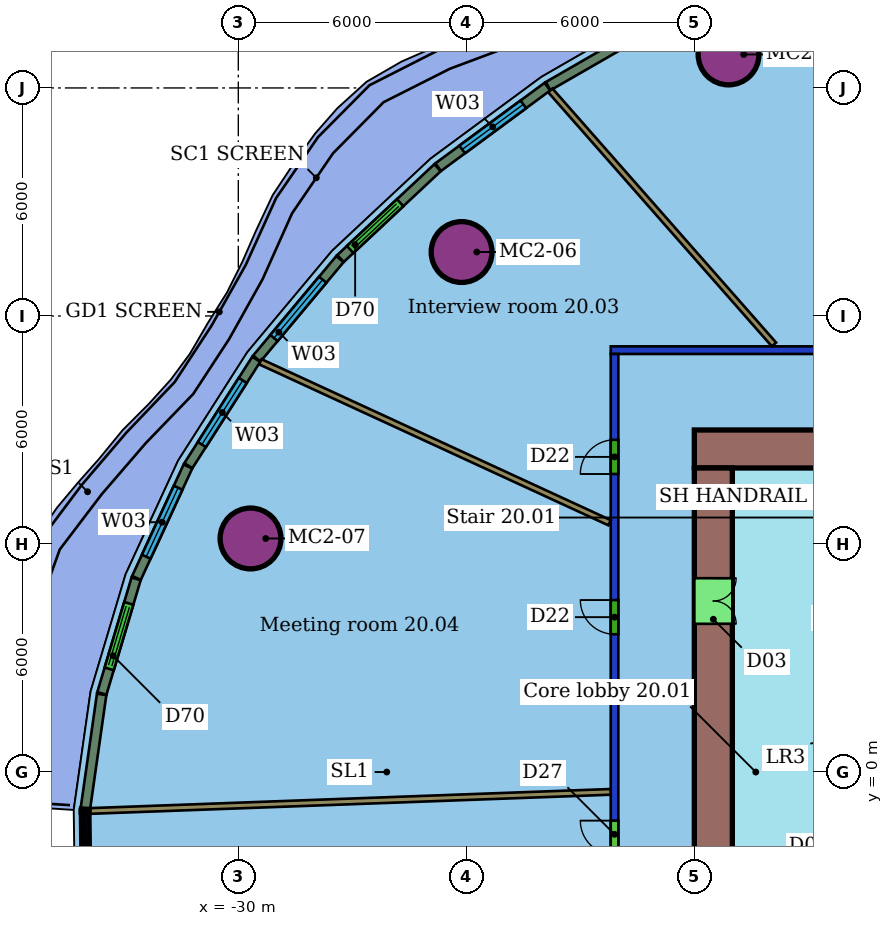
"""IFC4 building model, lengths in metres.
Left out: names, types, materials, properties, quantities, classifications, styles, units other than length and angle.
Written with IfcOpenShell. Run it as: python <this file> out.ifc"""

import sys

from ifc_helpers import new_model, si_unit, direction, frame, frame_2d, origin, origin_2d, place, context, subcontext, project, spatial, rectangle, hollow_circle, extrude, element, fill, save


model = new_model("IFC4")
c1 = context("Model", 3, precision=1e-05, world=origin(), true_north=direction((0.0, 1.0)))
c2 = subcontext(c1, "Body", "Model", "MODEL_VIEW")
j1 = project(units=[si_unit("LENGTHUNIT", "METRE"), si_unit("PLANEANGLEUNIT", "RADIAN")], contexts=[c1])
p1 = place(None, origin())
s1 = spatial("IfcSite", under=j1, at=p1, CompositionType="ELEMENT")
p2 = place(p1, origin())
s2 = spatial("IfcBuilding", under=s1, at=p2, CompositionType="ELEMENT")
p3 = place(p2, frame((0.0, 0.0, 92.2)))
s3 = spatial("IfcBuildingStorey", under=s2, at=p3, CompositionType="ELEMENT", Elevation=92.2)
for number, where, z_axis, x_axis in (
    (1, (-17.1, 18.881, 0.0), (0.0, 0.0, 1.0), (1.0, 0.0, 0.0)),
    (2, (-24.125, 13.683, 0.0), (0.0, 0.0, 1.0), (1.0, 0.0, 0.0)),
    (3, (-29.679, 6.146, 0.0), (0.0, 0.0, 1.0), (1.0, 0.0, 0.0)),
):
    element("IfcColumn", number, at=place(p3, frame(where, z_axis=z_axis, x_axis=x_axis)), inside=s3, PredefinedType="COLUMN", context=c2, shape_type="SweptSolid", body=[
        extrude(hollow_circle(Radius=0.8, WallThickness=0.055, at=origin_2d()), origin(), (0.0, 0.0, 1.0), 3.45),
    ])
p4 = place(p3, frame((-20.1, -11.0, 0.0), z_axis=(0.0, 0.0, 1.0), x_axis=(0.0, 1.0, 0.0)))
e4 = element("IfcWall", 4, at=p4, inside=s3, PredefinedType="PARTITIONING", context=c2, shape_type="SweptSolid", body=[
    extrude(rectangle(XDim=22.0, YDim=0.2, at=frame_2d((11.0, 0.0))), origin(), (0.0, 0.0, 1.0), 3.0),
])
p5 = place(p4, frame((18.842, 0.0, 0.0)))
e5 = element("IfcOpeningElement", 5, at=p5, cuts=e4, PredefinedType="OPENING", context=c2, shape_type="SweptSolid", body=[
    extrude(rectangle(XDim=0.9, YDim=2.1, at=frame_2d((0.45, 1.05))), frame((0.0, 0.11, 0.0), z_axis=(0.0, -1.0, 0.0), x_axis=(1.0, 0.0, 0.0)), (0.0, 0.0, 1.0), 0.22),
])
p6 = place(p4, frame((14.625, 0.0, 0.0)))
e6 = element("IfcOpeningElement", 6, at=p6, cuts=e4, PredefinedType="OPENING", context=c2, shape_type="SweptSolid", body=[
    extrude(rectangle(XDim=0.9, YDim=2.1, at=frame_2d((0.45, 1.05))), frame((0.0, 0.11, 0.0), z_axis=(0.0, -1.0, 0.0), x_axis=(1.0, 0.0, 0.0)), (0.0, 0.0, 1.0), 0.22),
])
p7 = place(p4, frame((7.921, 0.0, 0.0)))
e7 = element("IfcOpeningElement", 7, at=p7, cuts=e4, PredefinedType="OPENING", context=c2, shape_type="SweptSolid", body=[
    extrude(rectangle(XDim=1.8, YDim=2.4, at=frame_2d((0.9, 1.2))), frame((0.0, 0.11, 0.0), z_axis=(0.0, -1.0, 0.0), x_axis=(1.0, 0.0, 0.0)), (0.0, 0.0, 1.0), 0.22),
])
p8 = place(p3, frame((-20.2, 11.1, 0.0), z_axis=(0.0, 0.0, 1.0), x_axis=(1.0, 0.0, 0.0)))
e8 = element("IfcWall", 8, at=p8, inside=s3, PredefinedType="PARTITIONING", context=c2, shape_type="SweptSolid", body=[
    extrude(rectangle(XDim=28.4, YDim=0.2, at=frame_2d((14.2, 0.0))), origin(), (0.0, 0.0, 1.0), 3.0),
])
p9 = place(p8, frame((21.08, 0.0, 0.0)))
e9 = element("IfcOpeningElement", 9, at=p9, cuts=e8, PredefinedType="OPENING", context=c2, shape_type="SweptSolid", body=[
    extrude(rectangle(XDim=1.8, YDim=2.1, at=frame_2d((0.9, 1.05))), frame((0.0, 0.11, 0.0), z_axis=(0.0, -1.0, 0.0), x_axis=(1.0, 0.0, 0.0)), (0.0, 0.0, 1.0), 0.22),
])
p10 = place(p8, frame((12.812, 0.0, 0.0)))
e10 = element("IfcOpeningElement", 10, at=p10, cuts=e8, PredefinedType="OPENING", context=c2, shape_type="SweptSolid", body=[
    extrude(rectangle(XDim=1.8, YDim=2.1, at=frame_2d((0.9, 1.05))), frame((0.0, 0.11, 0.0), z_axis=(0.0, -1.0, 0.0), x_axis=(1.0, 0.0, 0.0)), (0.0, 0.0, 1.0), 0.22),
])
p11 = place(p3, frame((-21.79, 17.936, 0.0), z_axis=(0.0, 0.0, 1.0), x_axis=(0.660761943982, -0.750595532484, 0.0)))
e11 = element("IfcWall", 11, at=p11, inside=s3, PredefinedType="PARTITIONING", context=c2, shape_type="SweptSolid", body=[
    extrude(rectangle(XDim=8.909, YDim=0.15, at=frame_2d((4.454, 0.0))), origin(), (0.0, 0.0, 1.0), 3.45),
])
p12 = place(p3, frame((-29.421, 10.796, 0.0), z_axis=(0.0, 0.0, 1.0), x_axis=(0.908154893972, -0.418634313637, 0.0)))
e12 = element("IfcWall", 12, at=p12, inside=s3, PredefinedType="PARTITIONING", context=c2, shape_type="SweptSolid", body=[
    extrude(rectangle(XDim=10.119, YDim=0.15, at=frame_2d((5.06, 0.0))), origin(), (0.0, 0.0, 1.0), 3.45),
])
p13 = place(p3, frame((-33.907, -1.025, 0.0), z_axis=(0.0, 0.0, 1.0), x_axis=(0.999325981894, 0.036709425377, 0.0)))
e13 = element("IfcWall", 13, at=p13, inside=s3, PredefinedType="PARTITIONING", context=c2, shape_type="SweptSolid", body=[
    extrude(rectangle(XDim=13.714, YDim=0.15, at=frame_2d((6.857, 0.0))), origin(), (0.0, 0.0, 1.0), 3.45),
])
p14 = place(p3, frame((-18.741, 19.836, 0.0), z_axis=(0.0, 0.0, 1.0), x_axis=(-0.866511818646, -0.49915655675, 0.0)))
e14 = element("IfcWall", 14, at=p14, inside=s3, PredefinedType="SOLIDWALL", context=c2, shape_type="SweptSolid", body=[
    extrude(rectangle(XDim=3.586, YDim=0.25, at=frame_2d((1.793, 0.0))), origin(), (0.0, 0.0, 1.0), 3.05),
])
p15 = place(p3, frame((-21.867, 18.034, 0.0), z_axis=(0.0, 0.0, 1.0), x_axis=(-0.804847820355, -0.593481243234, 0.0)))
e15 = element("IfcWall", 15, at=p15, inside=s3, PredefinedType="SOLIDWALL", context=c2, shape_type="SweptSolid", body=[
    extrude(rectangle(XDim=3.57, YDim=0.25, at=frame_2d((1.785, 0.0))), origin(), (0.0, 0.0, 1.0), 3.05),
])
p16 = place(p15, frame((0.785, 0.0, 0.9)))
e16 = element("IfcOpeningElement", 16, at=p16, cuts=e15, PredefinedType="OPENING", context=c2, shape_type="SweptSolid", body=[
    extrude(rectangle(XDim=2.0, YDim=2.1, at=frame_2d((1.0, 1.05))), frame((0.0, 0.135, 0.0), z_axis=(0.0, -1.0, 0.0), x_axis=(1.0, 0.0, 0.0)), (0.0, 0.0, 1.0), 0.27),
])
p17 = place(p3, frame((-24.758, 15.901, 0.0), z_axis=(0.0, 0.0, 1.0), x_axis=(-0.730116287539, -0.68332291537, 0.0)))
e17 = element("IfcWall", 17, at=p17, inside=s3, PredefinedType="SOLIDWALL", context=c2, shape_type="SweptSolid", body=[
    extrude(rectangle(XDim=3.496, YDim=0.25, at=frame_2d((1.748, 0.0))), origin(), (0.0, 0.0, 1.0), 3.05),
])
p18 = place(p17, frame((1.348, 0.0, 0.0)))
e18 = element("IfcOpeningElement", 18, at=p18, cuts=e17, PredefinedType="OPENING", context=c2, shape_type="SweptSolid", body=[
    extrude(rectangle(XDim=1.8, YDim=2.4, at=frame_2d((0.9, 1.2))), frame((0.0, 0.135, 0.0), z_axis=(0.0, -1.0, 0.0), x_axis=(1.0, 0.0, 0.0)), (0.0, 0.0, 1.0), 0.27),
])
p19 = place(p3, frame((-27.326, 13.495, 0.0), z_axis=(0.0, 0.0, 1.0), x_axis=(-0.641415804232, -0.767193434593, 0.0)))
e19 = element("IfcWall", 19, at=p19, inside=s3, PredefinedType="SOLIDWALL", context=c2, shape_type="SweptSolid", body=[
    extrude(rectangle(XDim=3.41, YDim=0.25, at=frame_2d((1.705, 0.0))), origin(), (0.0, 0.0, 1.0), 3.05),
])
p20 = place(p19, frame((0.705, 0.0, 0.9)))
e20 = element("IfcOpeningElement", 20, at=p20, cuts=e19, PredefinedType="OPENING", context=c2, shape_type="SweptSolid", body=[
    extrude(rectangle(XDim=2.0, YDim=2.1, at=frame_2d((1.0, 1.05))), frame((0.0, 0.135, 0.0), z_axis=(0.0, -1.0, 0.0), x_axis=(1.0, 0.0, 0.0)), (0.0, 0.0, 1.0), 0.27),
])
p21 = place(p3, frame((-29.528, 10.86, 0.0), z_axis=(0.0, 0.0, 1.0), x_axis=(-0.537922040575, -0.8429945897, 0.0)))
e21 = element("IfcWall", 21, at=p21, inside=s3, PredefinedType="SOLIDWALL", context=c2, shape_type="SweptSolid", body=[
    extrude(rectangle(XDim=3.32, YDim=0.25, at=frame_2d((1.66, 0.0))), origin(), (0.0, 0.0, 1.0), 3.05),
])
p22 = place(p21, frame((0.66, 0.0, 0.9)))
e22 = element("IfcOpeningElement", 22, at=p22, cuts=e21, PredefinedType="OPENING", context=c2, shape_type="SweptSolid", body=[
    extrude(rectangle(XDim=2.0, YDim=2.1, at=frame_2d((1.0, 1.05))), frame((0.0, 0.135, 0.0), z_axis=(0.0, -1.0, 0.0), x_axis=(1.0, 0.0, 0.0)), (0.0, 0.0, 1.0), 0.27),
])
p23 = place(p3, frame((-31.326, 8.039, 0.0), z_axis=(0.0, 0.0, 1.0), x_axis=(-0.41936019053, -0.907819932916, 0.0)))
e23 = element("IfcWall", 23, at=p23, inside=s3, PredefinedType="SOLIDWALL", context=c2, shape_type="SweptSolid", body=[
    extrude(rectangle(XDim=3.229, YDim=0.25, at=frame_2d((1.615, 0.0))), origin(), (0.0, 0.0, 1.0), 3.05),
])
p24 = place(p23, frame((0.615, 0.0, 0.9)))
e24 = element("IfcOpeningElement", 24, at=p24, cuts=e23, PredefinedType="OPENING", context=c2, shape_type="SweptSolid", body=[
    extrude(rectangle(XDim=2.0, YDim=2.1, at=frame_2d((1.0, 1.05))), frame((0.0, 0.135, 0.0), z_axis=(0.0, -1.0, 0.0), x_axis=(1.0, 0.0, 0.0)), (0.0, 0.0, 1.0), 0.27),
])
p25 = place(p3, frame((-32.689, 5.083, 0.0), z_axis=(0.0, 0.0, 1.0), x_axis=(-0.286322623224, -0.958133266008, 0.0)))
e25 = element("IfcWall", 25, at=p25, inside=s3, PredefinedType="SOLIDWALL", context=c2, shape_type="SweptSolid", body=[
    extrude(rectangle(XDim=3.146, YDim=0.25, at=frame_2d((1.573, 0.0))), origin(), (0.0, 0.0, 1.0), 3.05),
])
p26 = place(p25, frame((0.673, 0.0, 0.0)))
e26 = element("IfcOpeningElement", 26, at=p26, cuts=e25, PredefinedType="OPENING", context=c2, shape_type="SweptSolid", body=[
    extrude(rectangle(XDim=1.8, YDim=2.4, at=frame_2d((0.9, 1.2))), frame((0.0, 0.135, 0.0), z_axis=(0.0, -1.0, 0.0), x_axis=(1.0, 0.0, 0.0)), (0.0, 0.0, 1.0), 0.27),
])
p27 = place(p3, frame((-33.596, 2.043, 0.0), z_axis=(0.0, 0.0, 1.0), x_axis=(-0.140993456439, -0.990010527844, 0.0)))
e27 = element("IfcWall", 27, at=p27, inside=s3, PredefinedType="SOLIDWALL", context=c2, shape_type="SweptSolid", body=[
    extrude(rectangle(XDim=3.035, YDim=0.25, at=frame_2d((1.518, 0.0))), origin(), (0.0, 0.0, 1.0), 3.05),
])
p28 = place(p3, frame((-6.0, 8.5, 0.0), z_axis=(0.0, 0.0, 1.0), x_axis=(-1.0, 0.0, 0.0)))
e28 = element("IfcWall", 28, at=p28, inside=s3, PredefinedType="SHEAR", context=c2, shape_type="SweptSolid", body=[
    extrude(rectangle(XDim=12.0, YDim=1.0, at=frame_2d((6.0, 0.0))), origin(), (0.0, 0.0, 1.0), 3.3),
])
p29 = place(p28, frame((5.2, 0.0, 0.0)))
e29 = element("IfcOpeningElement", 29, at=p29, cuts=e28, PredefinedType="OPENING", context=c2, shape_type="SweptSolid", body=[
    extrude(rectangle(XDim=1.2, YDim=2.1, at=frame_2d((0.6, 1.05))), frame((0.0, 0.51, 0.0), z_axis=(0.0, -1.0, 0.0), x_axis=(1.0, 0.0, 0.0)), (0.0, 0.0, 1.0), 1.02),
])
p30 = place(p3, frame((-17.5, 8.0, 0.0), z_axis=(0.0, 0.0, 1.0), x_axis=(0.0, -1.0, 0.0)))
e30 = element("IfcWall", 30, at=p30, inside=s3, PredefinedType="SHEAR", context=c2, shape_type="SweptSolid", body=[
    extrude(rectangle(XDim=16.0, YDim=1.0, at=frame_2d((8.0, 0.0))), origin(), (0.0, 0.0, 1.0), 3.3),
])
p31 = place(p30, frame((11.9, 0.0, 0.0)))
e31 = element("IfcOpeningElement", 31, at=p31, cuts=e30, PredefinedType="OPENING", context=c2, shape_type="SweptSolid", body=[
    extrude(rectangle(XDim=1.2, YDim=2.1, at=frame_2d((0.6, 1.05))), frame((0.0, 0.51, 0.0), z_axis=(0.0, -1.0, 0.0), x_axis=(1.0, 0.0, 0.0)), (0.0, 0.0, 1.0), 1.02),
])
p32 = place(p30, frame((2.9, 0.0, 0.0)))
e32 = element("IfcOpeningElement", 32, at=p32, cuts=e30, PredefinedType="OPENING", context=c2, shape_type="SweptSolid", body=[
    extrude(rectangle(XDim=1.2, YDim=2.1, at=frame_2d((0.6, 1.05))), frame((0.0, 0.51, 0.0), z_axis=(0.0, -1.0, 0.0), x_axis=(1.0, 0.0, 0.0)), (0.0, 0.0, 1.0), 1.02),
])
p33 = place(p5, origin())
e33 = element("IfcDoor", 33, at=p33, inside=s3, OperationType="SINGLE_SWING_LEFT", PredefinedType="DOOR", context=c2, shape_type="SweptSolid", body=[
    extrude(rectangle(XDim=0.9, YDim=2.1, at=frame_2d((0.45, 1.05))), frame((0.0, 0.025, 0.0), z_axis=(0.0, -1.0, 0.0), x_axis=(1.0, 0.0, 0.0)), (0.0, 0.0, 1.0), 0.05),
])
fill(e5, e33)
p34 = place(p6, origin())
e34 = element("IfcDoor", 34, at=p34, inside=s3, OperationType="SINGLE_SWING_RIGHT", PredefinedType="DOOR", context=c2, shape_type="SweptSolid", body=[
    extrude(rectangle(XDim=0.9, YDim=2.1, at=frame_2d((0.45, 1.05))), frame((0.0, 0.025, 0.0), z_axis=(0.0, -1.0, 0.0), x_axis=(1.0, 0.0, 0.0)), (0.0, 0.0, 1.0), 0.05),
])
fill(e6, e34)
p35 = place(p7, origin())
e35 = element("IfcDoor", 35, at=p35, inside=s3, OperationType="DOUBLE_DOOR_SINGLE_SWING", PredefinedType="DOOR", context=c2, shape_type="SweptSolid", body=[
    extrude(rectangle(XDim=1.8, YDim=2.4, at=frame_2d((0.9, 1.2))), frame((0.0, 0.025, 0.0), z_axis=(0.0, -1.0, 0.0), x_axis=(1.0, 0.0, 0.0)), (0.0, 0.0, 1.0), 0.05),
])
fill(e7, e35)
p36 = place(p16, origin())
e36 = element("IfcWindow", 36, at=p36, inside=s3, PartitioningType="SINGLE_PANEL", PredefinedType="WINDOW", context=c2, shape_type="SweptSolid", body=[
    extrude(rectangle(XDim=2.0, YDim=2.1, at=frame_2d((1.0, 1.05))), frame((0.0, 0.03, 0.0), z_axis=(0.0, -1.0, 0.0), x_axis=(1.0, 0.0, 0.0)), (0.0, 0.0, 1.0), 0.06),
])
fill(e16, e36)
p37 = place(p18, origin())
e37 = element("IfcDoor", 37, at=p37, inside=s3, OperationType="DOUBLE_DOOR_SLIDING", PredefinedType="DOOR", context=c2, shape_type="SweptSolid", body=[
    extrude(rectangle(XDim=1.8, YDim=2.4, at=frame_2d((0.9, 1.2))), frame((0.0, 0.025, 0.0), z_axis=(0.0, -1.0, 0.0), x_axis=(1.0, 0.0, 0.0)), (0.0, 0.0, 1.0), 0.05),
])
fill(e18, e37)
p38 = place(p20, origin())
e38 = element("IfcWindow", 38, at=p38, inside=s3, PartitioningType="SINGLE_PANEL", PredefinedType="WINDOW", context=c2, shape_type="SweptSolid", body=[
    extrude(rectangle(XDim=2.0, YDim=2.1, at=frame_2d((1.0, 1.05))), frame((0.0, 0.03, 0.0), z_axis=(0.0, -1.0, 0.0), x_axis=(1.0, 0.0, 0.0)), (0.0, 0.0, 1.0), 0.06),
])
fill(e20, e38)
p39 = place(p22, origin())
e39 = element("IfcWindow", 39, at=p39, inside=s3, PartitioningType="SINGLE_PANEL", PredefinedType="WINDOW", context=c2, shape_type="SweptSolid", body=[
    extrude(rectangle(XDim=2.0, YDim=2.1, at=frame_2d((1.0, 1.05))), frame((0.0, 0.03, 0.0), z_axis=(0.0, -1.0, 0.0), x_axis=(1.0, 0.0, 0.0)), (0.0, 0.0, 1.0), 0.06),
])
fill(e22, e39)
p40 = place(p24, origin())
e40 = element("IfcWindow", 40, at=p40, inside=s3, PartitioningType="SINGLE_PANEL", PredefinedType="WINDOW", context=c2, shape_type="SweptSolid", body=[
    extrude(rectangle(XDim=2.0, YDim=2.1, at=frame_2d((1.0, 1.05))), frame((0.0, 0.03, 0.0), z_axis=(0.0, -1.0, 0.0), x_axis=(1.0, 0.0, 0.0)), (0.0, 0.0, 1.0), 0.06),
])
fill(e24, e40)
p41 = place(p26, origin())
e41 = element("IfcDoor", 41, at=p41, inside=s3, OperationType="DOUBLE_DOOR_SLIDING", PredefinedType="DOOR", context=c2, shape_type="SweptSolid", body=[
    extrude(rectangle(XDim=1.8, YDim=2.4, at=frame_2d((0.9, 1.2))), frame((0.0, 0.025, 0.0), z_axis=(0.0, -1.0, 0.0), x_axis=(1.0, 0.0, 0.0)), (0.0, 0.0, 1.0), 0.05),
])
fill(e26, e41)
p42 = place(p32, origin())
e42 = element("IfcDoor", 42, at=p42, inside=s3, OperationType="DOUBLE_DOOR_SINGLE_SWING", PredefinedType="NOTDEFINED", context=c2, shape_type="SweptSolid", body=[
    extrude(rectangle(XDim=1.2, YDim=2.1, at=frame_2d((0.6, 1.05))), frame((0.0, 0.025, 0.0), z_axis=(0.0, -1.0, 0.0), x_axis=(1.0, 0.0, 0.0)), (0.0, 0.0, 1.0), 0.05),
])
fill(e32, e42)
save(model, sys.argv[1])
